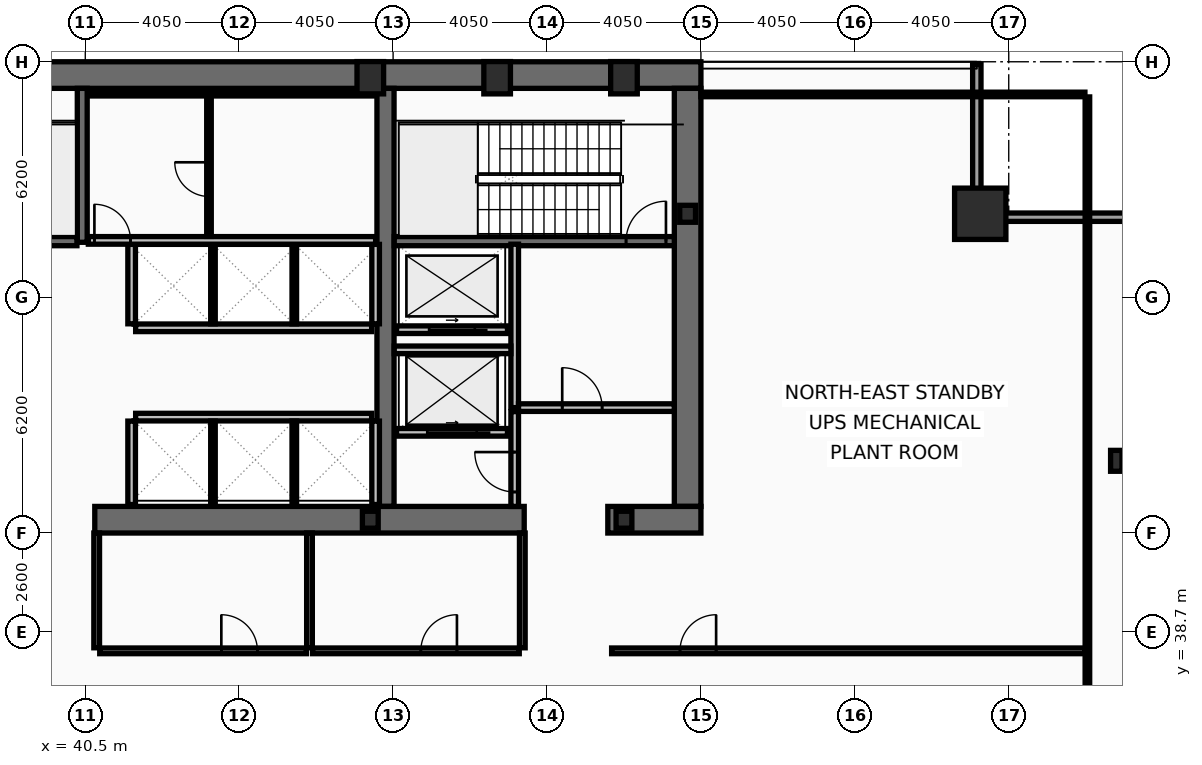
"""IFC4 building model, lengths in metres.
Left out: names, types, materials, properties, quantities, classifications, styles, units other than length and angle.
Written with IfcOpenShell. Run it as: python <this file> out.ifc"""

import sys

from ifc_helpers import new_model, si_unit, direction, frame, frame_2d, origin, origin_2d, place, context, subcontext, project, spatial, rectangle, hollow_rectangle, i_section, extrude, element, fill, save


model = new_model("IFC4")
c1 = context("Model", 3, precision=1e-05, world=origin(), true_north=direction((0.0, 1.0)))
c2 = subcontext(c1, "Body", "Model", "MODEL_VIEW")
j1 = project(units=[si_unit("LENGTHUNIT", "METRE"), si_unit("PLANEANGLEUNIT", "RADIAN")], contexts=[c1])
p1 = place(None, origin())
s1 = spatial("IfcSite", under=j1, at=p1, CompositionType="ELEMENT")
p2 = place(p1, origin())
s2 = spatial("IfcBuilding", under=s1, at=p2, CompositionType="ELEMENT")
p3 = place(p2, frame((0.0, 0.0, 172.2)))
s3 = spatial("IfcBuildingStorey", under=s2, at=p3, CompositionType="ELEMENT", Elevation=172.2)
p4 = place(p3, frame((16.2, 53.35, 0.0), z_axis=(0.0, 0.0, 1.0), x_axis=(1.0, 0.0, 0.0)))
e1 = element("IfcWall", 1, at=p4, inside=s3, PredefinedType="SHEAR", context=c2, shape_type="SweptSolid", body=[
    extrude(rectangle(XDim=40.5, YDim=0.7, at=frame_2d((20.25, 0.0))), origin(), (0.0, 0.0, 1.0), 4.64),
])
p5 = place(p3, frame((56.35, 53.0, 0.0), z_axis=(0.0, 0.0, 1.0), x_axis=(0.0, -1.0, 0.0)))
e2 = element("IfcWall", 2, at=p5, inside=s3, PredefinedType="SHEAR", context=c2, shape_type="SweptSolid", body=[
    extrude(rectangle(XDim=11.0, YDim=0.7, at=frame_2d((5.5, 0.0))), origin(), (0.0, 0.0, 1.0), 4.64),
])
p6 = place(p3, frame((48.4, 42.0, 0.0), z_axis=(0.0, 0.0, 1.0), x_axis=(0.0, 1.0, 0.0)))
e3 = element("IfcWall", 3, at=p6, inside=s3, PredefinedType="SHEAR", context=c2, shape_type="SweptSolid", body=[
    extrude(rectangle(XDim=11.0, YDim=0.45, at=frame_2d((5.5, 0.0))), origin(), (0.0, 0.0, 1.0), 4.64),
])
p7 = place(p3, frame((52.05, 41.65, 0.0), z_axis=(0.0, 0.0, 1.0), x_axis=(-1.0, 0.0, 0.0)))
e4 = element("IfcWall", 4, at=p7, inside=s3, PredefinedType="SHEAR", context=c2, shape_type="SweptSolid", body=[
    extrude(rectangle(XDim=11.3, YDim=0.7, at=frame_2d((5.65, 0.0))), origin(), (0.0, 0.0, 1.0), 4.64),
])
p8 = place(p3, frame((56.7, 41.65, 0.0), z_axis=(0.0, 0.0, 1.0), x_axis=(-1.0, 0.0, 0.0)))
e5 = element("IfcWall", 5, at=p8, inside=s3, PredefinedType="SHEAR", context=c2, shape_type="SweptSolid", body=[
    extrude(rectangle(XDim=2.45, YDim=0.7, at=frame_2d((1.225, 0.0))), origin(), (0.0, 0.0, 1.0), 4.64),
])
p9 = place(p3, frame((40.42, 48.95, 0.0), z_axis=(0.0, 0.0, 1.0), x_axis=(0.0, 1.0, 0.0)))
e6 = element("IfcWall", 6, at=p9, inside=s3, PredefinedType="SHEAR", context=c2, shape_type="SweptSolid", body=[
    extrude(rectangle(XDim=4.05, YDim=0.26, at=frame_2d((2.025, 0.0))), origin(), (0.0, 0.0, 1.0), 4.64),
])
p10 = place(p3, frame((48.63, 48.98, 0.0), z_axis=(0.0, 0.0, 1.0), x_axis=(1.0, 0.0, 0.0)))
e7 = element("IfcWall", 7, at=p10, inside=s3, PredefinedType="SHEAR", context=c2, shape_type="SweptSolid", body=[
    extrude(rectangle(XDim=7.37, YDim=0.24, at=frame_2d((3.685, 0.0))), origin(), (0.0, 0.0, 1.0), 4.64),
])
p11 = place(p10, frame((6.1, 0.0, 0.0)))
e8 = element("IfcOpeningElement", 8, at=p11, cuts=e7, PredefinedType="OPENING", context=c2, shape_type="SweptSolid", body=[
    extrude(rectangle(XDim=1.05, YDim=2.15, at=frame_2d((0.525, 1.075))), frame((0.0, 0.13, 0.0), z_axis=(0.0, -1.0, 0.0), x_axis=(1.0, 0.0, 0.0)), (0.0, 0.0, 1.0), 0.26),
])
p12 = place(p3, frame((32.72, 48.98, 0.0), z_axis=(0.0, 0.0, 1.0), x_axis=(1.0, 0.0, 0.0)))
e9 = element("IfcWall", 9, at=p12, inside=s3, PredefinedType="SHEAR", context=c2, shape_type="SweptSolid", body=[
    extrude(rectangle(XDim=7.56, YDim=0.24, at=frame_2d((3.78, 0.0))), origin(), (0.0, 0.0, 1.0), 4.64),
])
p13 = place(p12, frame((0.22, 0.0, 0.0)))
e10 = element("IfcOpeningElement", 10, at=p13, cuts=e9, PredefinedType="OPENING", context=c2, shape_type="SweptSolid", body=[
    extrude(rectangle(XDim=1.05, YDim=2.15, at=frame_2d((0.525, 1.075))), frame((0.0, 0.13, 0.0), z_axis=(0.0, -1.0, 0.0), x_axis=(1.0, 0.0, 0.0)), (0.0, 0.0, 1.0), 0.26),
])
p14 = place(p3, frame((64.05, 49.7, 0.0), z_axis=(0.0, 0.0, 1.0), x_axis=(1.0, 0.0, 0.0)))
e11 = element("IfcColumn", 11, at=p14, inside=s3, PredefinedType="COLUMN", context=c2, shape_type="SweptSolid", body=[
    extrude(hollow_rectangle(XDim=1.35, YDim=1.35, WallThickness=0.065, at=origin_2d()), origin(), (0.0, 0.0, 1.0), 4.8),
])
for number, where, z_axis, x_axis in (
    (12, (48.0, 53.28, 0.0), (0.0, 0.0, 1.0), (1.0, 0.0, 0.0)),
    (13, (51.337, 53.28, 0.0), (0.0, 0.0, 1.0), (1.0, 0.0, 0.0)),
    (14, (54.675, 53.28, 0.0), (0.0, 0.0, 1.0), (1.0, 0.0, 0.0)),
):
    element("IfcColumn", number, at=place(p3, frame(where, z_axis=z_axis, x_axis=x_axis)), inside=s3, PredefinedType="COLUMN", context=c2, shape_type="SweptSolid", body=[
        extrude(hollow_rectangle(XDim=0.7, YDim=0.85, WallThickness=0.05, at=origin_2d()), origin(), (0.0, 0.0, 1.0), 4.8),
    ])
p15 = place(p3, frame((67.63, 43.2, 0.0), z_axis=(0.0, 0.0, 1.0), x_axis=(1.0, 0.0, 0.0)))
e15 = element("IfcColumn", 15, at=p15, inside=s3, PredefinedType="COLUMN", context=c2, shape_type="SweptSolid", body=[
    extrude(i_section(OverallWidth=0.3, OverallDepth=0.55, WebThickness=0.015, FlangeThickness=0.029, at=origin_2d()), origin(), (0.0, 0.0, 1.0), 4.8),
])
for number, where, z_axis, x_axis in (
    (16, (56.35, 49.7, 0.0), (0.0, 0.0, 1.0), (1.0, 0.0, 0.0)),
    (17, (48.0, 41.65, 0.0), (0.0, 0.0, 1.0), (1.0, 0.0, 0.0)),
    (18, (54.675, 41.65, 0.0), (0.0, 0.0, 1.0), (1.0, 0.0, 0.0)),
):
    element("IfcColumn", number, at=place(p3, frame(where, z_axis=z_axis, x_axis=x_axis)), inside=s3, PredefinedType="COLUMN", context=c2, shape_type="SweptSolid", body=[
        extrude(i_section(OverallWidth=0.416, OverallDepth=0.446, WebThickness=0.039, FlangeThickness=0.063, at=origin_2d()), origin(), (0.0, 0.0, 1.0), 4.8),
    ])
p16 = place(p3, frame((63.96, 53.63, 0.0), z_axis=(0.0, 0.0, 1.0), x_axis=(0.0, -1.0, 0.0)))
e19 = element("IfcWall", 19, at=p16, inside=s3, PredefinedType="SOLIDWALL", context=c2, shape_type="SweptSolid", body=[
    extrude(rectangle(XDim=3.91, YDim=0.22, at=frame_2d((1.955, 0.0))), origin(), (0.0, 0.0, 1.0), 4.03),
])
p17 = place(p3, frame((63.85, 49.61, 0.0), z_axis=(0.0, 0.0, 1.0), x_axis=(1.0, 0.0, 0.0)))
e20 = element("IfcWall", 20, at=p17, inside=s3, PredefinedType="SOLIDWALL", context=c2, shape_type="SweptSolid", body=[
    extrude(rectangle(XDim=4.22, YDim=0.22, at=frame_2d((2.11, 0.0))), origin(), (0.0, 0.0, 1.0), 4.03),
])
p18 = place(p3, frame((51.61, 43.95, 0.0), z_axis=(0.0, 0.0, 1.0), x_axis=(-1.0, 0.0, 0.0)))
e21 = element("IfcWall", 21, at=p18, inside=s3, PredefinedType="PARTITIONING", context=c2, shape_type="SweptSolid", body=[
    extrude(rectangle(XDim=2.92, YDim=0.2, at=frame_2d((1.46, 0.0))), origin(), (0.0, 0.0, 1.0), 4.64),
])
p19 = place(p18, frame((0.81, 0.0, 0.0)))
e22 = element("IfcOpeningElement", 22, at=p19, cuts=e21, PredefinedType="OPENING", context=c2, shape_type="SweptSolid", body=[
    extrude(rectangle(XDim=1.3, YDim=2.18, at=frame_2d((0.65, 1.09))), frame((0.0, 0.11, 0.0), z_axis=(0.0, -1.0, 0.0), x_axis=(1.0, 0.0, 0.0)), (0.0, 0.0, 1.0), 0.22),
])
p20 = place(p3, frame((51.61, 46.65, 0.0), z_axis=(0.0, 0.0, 1.0), x_axis=(-1.0, 0.0, 0.0)))
e23 = element("IfcWall", 23, at=p20, inside=s3, PredefinedType="PARTITIONING", context=c2, shape_type="SweptSolid", body=[
    extrude(rectangle(XDim=2.92, YDim=0.2, at=frame_2d((1.46, 0.0))), origin(), (0.0, 0.0, 1.0), 4.64),
])
p21 = place(p20, frame((0.86, 0.0, 0.0)))
e24 = element("IfcOpeningElement", 24, at=p21, cuts=e23, PredefinedType="OPENING", context=c2, shape_type="SweptSolid", body=[
    extrude(rectangle(XDim=1.2, YDim=2.18, at=frame_2d((0.6, 1.09))), frame((0.0, 0.11, 0.0), z_axis=(0.0, -1.0, 0.0), x_axis=(1.0, 0.0, 0.0)), (0.0, 0.0, 1.0), 0.22),
])
p22 = place(p3, frame((51.8, 44.6, 0.0), z_axis=(0.0, 0.0, 1.0), x_axis=(0.0, 1.0, 0.0)))
e25 = element("IfcWall", 25, at=p22, inside=s3, PredefinedType="PARTITIONING", context=c2, shape_type="SweptSolid", body=[
    extrude(rectangle(XDim=4.3, YDim=0.2, at=frame_2d((2.15, 0.0))), origin(), (0.0, 0.0, 1.0), 4.64),
])
p23 = place(p3, frame((51.9, 44.6, 0.0), z_axis=(0.0, 0.0, 1.0), x_axis=(1.0, 0.0, 0.0)))
e26 = element("IfcWall", 26, at=p23, inside=s3, PredefinedType="PARTITIONING", context=c2, shape_type="SweptSolid", body=[
    extrude(rectangle(XDim=4.1, YDim=0.2, at=frame_2d((2.05, 0.0))), origin(), (0.0, 0.0, 1.0), 4.64),
])
p24 = place(p23, frame((1.15, 0.0, 0.0)))
e27 = element("IfcOpeningElement", 27, at=p24, cuts=e26, PredefinedType="OPENING", context=c2, shape_type="SweptSolid", body=[
    extrude(rectangle(XDim=1.05, YDim=2.15, at=frame_2d((0.525, 1.075))), frame((0.0, 0.11, 0.0), z_axis=(0.0, -1.0, 0.0), x_axis=(1.0, 0.0, 0.0)), (0.0, 0.0, 1.0), 0.22),
])
p25 = place(p3, frame((48.63, 46.12, 0.0), z_axis=(0.0, 0.0, 1.0), x_axis=(1.0, 0.0, 0.0)))
e28 = element("IfcWall", 28, at=p25, inside=s3, PredefinedType="PARTITIONING", context=c2, shape_type="SweptSolid", body=[
    extrude(rectangle(XDim=3.07, YDim=0.2, at=frame_2d((1.535, 0.0))), origin(), (0.0, 0.0, 1.0), 4.64),
])
p26 = place(p3, frame((51.8, 42.0, 0.0), z_axis=(0.0, 0.0, 1.0), x_axis=(0.0, 1.0, 0.0)))
e29 = element("IfcWall", 29, at=p26, inside=s3, PredefinedType="PARTITIONING", context=c2, shape_type="SweptSolid", body=[
    extrude(rectangle(XDim=2.495, YDim=0.2, at=frame_2d((1.248, 0.0))), origin(), (0.0, 0.0, 1.0), 4.64),
])
p27 = place(p26, frame((0.38, 0.0, 0.0)))
e30 = element("IfcOpeningElement", 30, at=p27, cuts=e29, PredefinedType="OPENING", context=c2, shape_type="SweptSolid", body=[
    extrude(rectangle(XDim=1.05, YDim=2.15, at=frame_2d((0.525, 1.075))), frame((0.0, 0.11, 0.0), z_axis=(0.0, -1.0, 0.0), x_axis=(1.0, 0.0, 0.0)), (0.0, 0.0, 1.0), 0.22),
])
p28 = place(p3, frame((41.825, 46.7, 0.0), z_axis=(0.0, 0.0, 1.0), x_axis=(1.0, 0.0, 0.0)))
e31 = element("IfcWall", 31, at=p28, inside=s3, PredefinedType="PARTITIONING", context=c2, shape_type="SweptSolid", body=[
    extrude(rectangle(XDim=6.21, YDim=0.2, at=frame_2d((3.105, 0.0))), origin(), (0.0, 0.0, 1.0), 4.64),
])
for number, where, z_axis, x_axis in (
    (32, (41.72, 46.805, 0.0), (0.0, 0.0, 1.0), (0.0, 1.0, 0.0)),
    (33, (48.14, 46.805, 0.0), (0.0, 0.0, 1.0), (0.0, 1.0, 0.0)),
):
    element("IfcWall", number, at=place(p3, frame(where, z_axis=z_axis, x_axis=x_axis)), inside=s3, PredefinedType="PARTITIONING", context=c2, shape_type="SweptSolid", body=[
        extrude(rectangle(XDim=2.09, YDim=0.2, at=frame_2d((1.045, 0.0))), origin(), (0.0, 0.0, 1.0), 4.64),
    ])
for number, where, z_axis, x_axis in (
    (34, (43.86, 46.805, 0.0), (0.0, 0.0, 1.0), (0.0, 1.0, 0.0)),
    (35, (46.0, 46.805, 0.0), (0.0, 0.0, 1.0), (0.0, 1.0, 0.0)),
):
    element("IfcWall", number, at=place(p3, frame(where, z_axis=z_axis, x_axis=x_axis)), inside=s3, PredefinedType="PARTITIONING", context=c2, shape_type="SweptSolid", body=[
        extrude(rectangle(XDim=2.09, YDim=0.12, at=frame_2d((1.045, 0.0))), origin(), (0.0, 0.0, 1.0), 4.64),
    ])
p29 = place(p3, frame((41.825, 44.35, 0.0), z_axis=(0.0, 0.0, 1.0), x_axis=(1.0, 0.0, 0.0)))
e36 = element("IfcWall", 36, at=p29, inside=s3, PredefinedType="PARTITIONING", context=c2, shape_type="SweptSolid", body=[
    extrude(rectangle(XDim=6.21, YDim=0.2, at=frame_2d((3.105, 0.0))), origin(), (0.0, 0.0, 1.0), 4.64),
])
for number, where, z_axis, x_axis in (
    (37, (41.72, 42.05, 0.0), (0.0, 0.0, 1.0), (0.0, 1.0, 0.0)),
    (38, (48.14, 42.05, 0.0), (0.0, 0.0, 1.0), (0.0, 1.0, 0.0)),
):
    element("IfcWall", number, at=place(p3, frame(where, z_axis=z_axis, x_axis=x_axis)), inside=s3, PredefinedType="PARTITIONING", context=c2, shape_type="SweptSolid", body=[
        extrude(rectangle(XDim=2.195, YDim=0.2, at=frame_2d((1.098, 0.0))), origin(), (0.0, 0.0, 1.0), 4.64),
    ])
for number, where, z_axis, x_axis in (
    (39, (43.86, 42.05, 0.0), (0.0, 0.0, 1.0), (0.0, 1.0, 0.0)),
    (40, (46.0, 42.05, 0.0), (0.0, 0.0, 1.0), (0.0, 1.0, 0.0)),
):
    element("IfcWall", number, at=place(p3, frame(where, z_axis=z_axis, x_axis=x_axis)), inside=s3, PredefinedType="PARTITIONING", context=c2, shape_type="SweptSolid", body=[
        extrude(rectangle(XDim=2.195, YDim=0.12, at=frame_2d((1.098, 0.0))), origin(), (0.0, 0.0, 1.0), 4.64),
    ])
p30 = place(p3, frame((40.58, 52.86, 0.0), z_axis=(0.0, 0.0, 1.0), x_axis=(1.0, 0.0, 0.0)))
e41 = element("IfcWall", 41, at=p30, inside=s3, PredefinedType="PARTITIONING", context=c2, shape_type="SweptSolid", body=[
    extrude(rectangle(XDim=7.56, YDim=0.12, at=frame_2d((3.78, 0.0))), origin(), (0.0, 0.0, 1.0), 4.64),
])
p31 = place(p3, frame((40.58, 49.0, 0.0), z_axis=(0.0, 0.0, 1.0), x_axis=(1.0, 0.0, 0.0)))
e42 = element("IfcWall", 42, at=p31, inside=s3, PredefinedType="PARTITIONING", context=c2, shape_type="SweptSolid", body=[
    extrude(rectangle(XDim=7.56, YDim=0.2, at=frame_2d((3.78, 0.0))), origin(), (0.0, 0.0, 1.0), 4.64),
])
p32 = place(p31, frame((0.16, 0.0, 0.0)))
e43 = element("IfcOpeningElement", 43, at=p32, cuts=e42, PredefinedType="OPENING", context=c2, shape_type="SweptSolid", body=[
    extrude(rectangle(XDim=0.95, YDim=2.1, at=frame_2d((0.475, 1.05))), frame((0.0, 0.11, 0.0), z_axis=(0.0, -1.0, 0.0), x_axis=(1.0, 0.0, 0.0)), (0.0, 0.0, 1.0), 0.22),
])
p33 = place(p3, frame((43.755, 49.105, 0.0), z_axis=(0.0, 0.0, 1.0), x_axis=(0.0, 1.0, 0.0)))
e44 = element("IfcWall", 44, at=p33, inside=s3, PredefinedType="PARTITIONING", context=c2, shape_type="SweptSolid", body=[
    extrude(rectangle(XDim=3.69, YDim=0.12, at=frame_2d((1.845, 0.0))), origin(), (0.0, 0.0, 1.0), 4.64),
])
p34 = place(p33, frame((1.05, 0.0, 0.0)))
e45 = element("IfcOpeningElement", 45, at=p34, cuts=e44, PredefinedType="OPENING", context=c2, shape_type="SweptSolid", body=[
    extrude(rectangle(XDim=0.9, YDim=2.05, at=frame_2d((0.45, 1.025))), frame((0.0, 0.07, 0.0), z_axis=(0.0, -1.0, 0.0), x_axis=(1.0, 0.0, 0.0)), (0.0, 0.0, 1.0), 0.14),
])
p35 = place(p3, frame((40.88, 38.2, 0.0), z_axis=(0.0, 0.0, 1.0), x_axis=(1.0, 0.0, 0.0)))
e46 = element("IfcWall", 46, at=p35, inside=s3, PredefinedType="PARTITIONING", context=c2, shape_type="SweptSolid", body=[
    extrude(rectangle(XDim=5.44, YDim=0.15, at=frame_2d((2.72, 0.0))), origin(), (0.0, 0.0, 1.0), 3.93),
])
p36 = place(p35, frame((3.2, 0.0, 0.0)))
e47 = element("IfcOpeningElement", 47, at=p36, cuts=e46, PredefinedType="OPENING", context=c2, shape_type="SweptSolid", body=[
    extrude(rectangle(XDim=0.95, YDim=2.1, at=frame_2d((0.475, 1.05))), frame((0.0, 0.085, 0.0), z_axis=(0.0, -1.0, 0.0), x_axis=(1.0, 0.0, 0.0)), (0.0, 0.0, 1.0), 0.17),
])
p37 = place(p3, frame((46.48, 38.2, 0.0), z_axis=(0.0, 0.0, 1.0), x_axis=(1.0, 0.0, 0.0)))
e48 = element("IfcWall", 48, at=p37, inside=s3, PredefinedType="PARTITIONING", context=c2, shape_type="SweptSolid", body=[
    extrude(rectangle(XDim=5.44, YDim=0.15, at=frame_2d((2.72, 0.0))), origin(), (0.0, 0.0, 1.0), 3.93),
])
p38 = place(p37, frame((2.85, 0.0, 0.0)))
e49 = element("IfcOpeningElement", 49, at=p38, cuts=e48, PredefinedType="OPENING", context=c2, shape_type="SweptSolid", body=[
    extrude(rectangle(XDim=0.95, YDim=2.1, at=frame_2d((0.475, 1.05))), frame((0.0, 0.085, 0.0), z_axis=(0.0, -1.0, 0.0), x_axis=(1.0, 0.0, 0.0)), (0.0, 0.0, 1.0), 0.17),
])
for number, where, z_axis, x_axis in (
    (50, (40.8, 38.28, 0.0), (0.0, 0.0, 1.0), (0.0, 1.0, 0.0)),
    (51, (46.4, 38.28, 0.0), (0.0, 0.0, 1.0), (0.0, 1.0, 0.0)),
    (52, (52.0, 38.28, 0.0), (0.0, 0.0, 1.0), (0.0, 1.0, 0.0)),
):
    element("IfcWall", number, at=place(p3, frame(where, z_axis=z_axis, x_axis=x_axis)), inside=s3, PredefinedType="PARTITIONING", context=c2, shape_type="SweptSolid", body=[
        extrude(rectangle(XDim=3.02, YDim=0.15, at=frame_2d((1.51, 0.0))), origin(), (0.0, 0.0, 1.0), 4.64),
    ])
p39 = place(p3, frame((54.35, 38.2, 0.0), z_axis=(0.0, 0.0, 1.0), x_axis=(1.0, 0.0, 0.0)))
e53 = element("IfcWall", 53, at=p39, inside=s3, PredefinedType="PARTITIONING", context=c2, shape_type="SweptSolid", body=[
    extrude(rectangle(XDim=12.455, YDim=0.15, at=frame_2d((6.228, 0.0))), origin(), (0.0, 0.0, 1.0), 3.93),
])
p40 = place(p39, frame((1.8, 0.0, 0.0)))
e54 = element("IfcOpeningElement", 54, at=p40, cuts=e53, PredefinedType="OPENING", context=c2, shape_type="SweptSolid", body=[
    extrude(rectangle(XDim=0.95, YDim=2.1, at=frame_2d((0.475, 1.05))), frame((0.0, 0.085, 0.0), z_axis=(0.0, -1.0, 0.0), x_axis=(1.0, 0.0, 0.0)), (0.0, 0.0, 1.0), 0.17),
])
p41 = place(p3, frame((66.87, 10.665, 0.0), z_axis=(0.0, 0.0, 1.0), x_axis=(0.0, 1.0, 0.0)))
e55 = element("IfcWall", 55, at=p41, inside=s3, PredefinedType="PARTITIONING", context=c2, shape_type="SweptSolid", body=[
    extrude(rectangle(XDim=42.11, YDim=0.12, at=frame_2d((21.055, 0.0))), origin(), (0.0, 0.0, 1.0), 3.93),
])
p42 = place(p3, frame((56.7, 52.84, 0.0), z_axis=(0.0, 0.0, 1.0), x_axis=(1.0, 0.0, 0.0)))
e56 = element("IfcWall", 56, at=p42, inside=s3, PredefinedType="PARTITIONING", context=c2, shape_type="SweptSolid", body=[
    extrude(rectangle(XDim=10.105, YDim=0.12, at=frame_2d((5.052, 0.0))), origin(), (0.0, 0.0, 1.0), 4.64),
])
p43 = place(p11, origin())
e57 = element("IfcDoor", 57, at=p43, inside=s3, OperationType="SINGLE_SWING_RIGHT", PredefinedType="DOOR", context=c2, shape_type="SweptSolid", body=[
    extrude(rectangle(XDim=1.05, YDim=2.15, at=frame_2d((0.525, 1.075))), frame((0.0, 0.025, 0.0), z_axis=(0.0, -1.0, 0.0), x_axis=(1.0, 0.0, 0.0)), (0.0, 0.0, 1.0), 0.05),
])
fill(e8, e57)
p44 = place(p19, origin())
e58 = element("IfcDoor", 58, at=p44, inside=s3, OperationType="SLIDING_TO_LEFT", PredefinedType="DOOR", context=c2, shape_type="SweptSolid", body=[
    extrude(rectangle(XDim=1.3, YDim=2.18, at=frame_2d((0.65, 1.09))), frame((0.0, 0.025, 0.0), z_axis=(0.0, -1.0, 0.0), x_axis=(1.0, 0.0, 0.0)), (0.0, 0.0, 1.0), 0.05),
])
fill(e22, e58)
p45 = place(p21, origin())
e59 = element("IfcDoor", 59, at=p45, inside=s3, OperationType="SLIDING_TO_LEFT", PredefinedType="DOOR", context=c2, shape_type="SweptSolid", body=[
    extrude(rectangle(XDim=1.2, YDim=2.18, at=frame_2d((0.6, 1.09))), frame((0.0, 0.025, 0.0), z_axis=(0.0, -1.0, 0.0), x_axis=(1.0, 0.0, 0.0)), (0.0, 0.0, 1.0), 0.05),
])
fill(e24, e59)
p46 = place(p24, origin())
e60 = element("IfcDoor", 60, at=p46, inside=s3, OperationType="SINGLE_SWING_LEFT", PredefinedType="DOOR", context=c2, shape_type="SweptSolid", body=[
    extrude(rectangle(XDim=1.05, YDim=2.15, at=frame_2d((0.525, 1.075))), frame((0.0, 0.025, 0.0), z_axis=(0.0, -1.0, 0.0), x_axis=(1.0, 0.0, 0.0)), (0.0, 0.0, 1.0), 0.05),
])
fill(e27, e60)
p47 = place(p27, origin())
e61 = element("IfcDoor", 61, at=p47, inside=s3, OperationType="SINGLE_SWING_RIGHT", PredefinedType="DOOR", context=c2, shape_type="SweptSolid", body=[
    extrude(rectangle(XDim=1.05, YDim=2.15, at=frame_2d((0.525, 1.075))), frame((0.0, 0.025, 0.0), z_axis=(0.0, -1.0, 0.0), x_axis=(1.0, 0.0, 0.0)), (0.0, 0.0, 1.0), 0.05),
])
fill(e30, e61)
p48 = place(p32, origin())
e62 = element("IfcDoor", 62, at=p48, inside=s3, OperationType="SINGLE_SWING_LEFT", PredefinedType="DOOR", context=c2, shape_type="SweptSolid", body=[
    extrude(rectangle(XDim=0.95, YDim=2.1, at=frame_2d((0.475, 1.05))), frame((0.0, 0.025, 0.0), z_axis=(0.0, -1.0, 0.0), x_axis=(1.0, 0.0, 0.0)), (0.0, 0.0, 1.0), 0.05),
])
fill(e43, e62)
p49 = place(p34, origin())
e63 = element("IfcDoor", 63, at=p49, inside=s3, OperationType="SINGLE_SWING_RIGHT", PredefinedType="DOOR", context=c2, shape_type="SweptSolid", body=[
    extrude(rectangle(XDim=0.9, YDim=2.05, at=frame_2d((0.45, 1.025))), frame((0.0, 0.025, 0.0), z_axis=(0.0, -1.0, 0.0), x_axis=(1.0, 0.0, 0.0)), (0.0, 0.0, 1.0), 0.05),
])
fill(e45, e63)
p50 = place(p36, origin())
e64 = element("IfcDoor", 64, at=p50, inside=s3, OperationType="SINGLE_SWING_LEFT", PredefinedType="DOOR", context=c2, shape_type="SweptSolid", body=[
    extrude(rectangle(XDim=0.95, YDim=2.1, at=frame_2d((0.475, 1.05))), frame((0.0, 0.025, 0.0), z_axis=(0.0, -1.0, 0.0), x_axis=(1.0, 0.0, 0.0)), (0.0, 0.0, 1.0), 0.05),
])
fill(e47, e64)
p51 = place(p38, origin())
e65 = element("IfcDoor", 65, at=p51, inside=s3, OperationType="SINGLE_SWING_RIGHT", PredefinedType="DOOR", context=c2, shape_type="SweptSolid", body=[
    extrude(rectangle(XDim=0.95, YDim=2.1, at=frame_2d((0.475, 1.05))), frame((0.0, 0.025, 0.0), z_axis=(0.0, -1.0, 0.0), x_axis=(1.0, 0.0, 0.0)), (0.0, 0.0, 1.0), 0.05),
])
fill(e49, e65)
p52 = place(p40, origin())
e66 = element("IfcDoor", 66, at=p52, inside=s3, OperationType="SINGLE_SWING_RIGHT", PredefinedType="DOOR", context=c2, shape_type="SweptSolid", body=[
    extrude(rectangle(XDim=0.95, YDim=2.1, at=frame_2d((0.475, 1.05))), frame((0.0, 0.025, 0.0), z_axis=(0.0, -1.0, 0.0), x_axis=(1.0, 0.0, 0.0)), (0.0, 0.0, 1.0), 0.05),
])
fill(e54, e66)
save(model, sys.argv[1])
